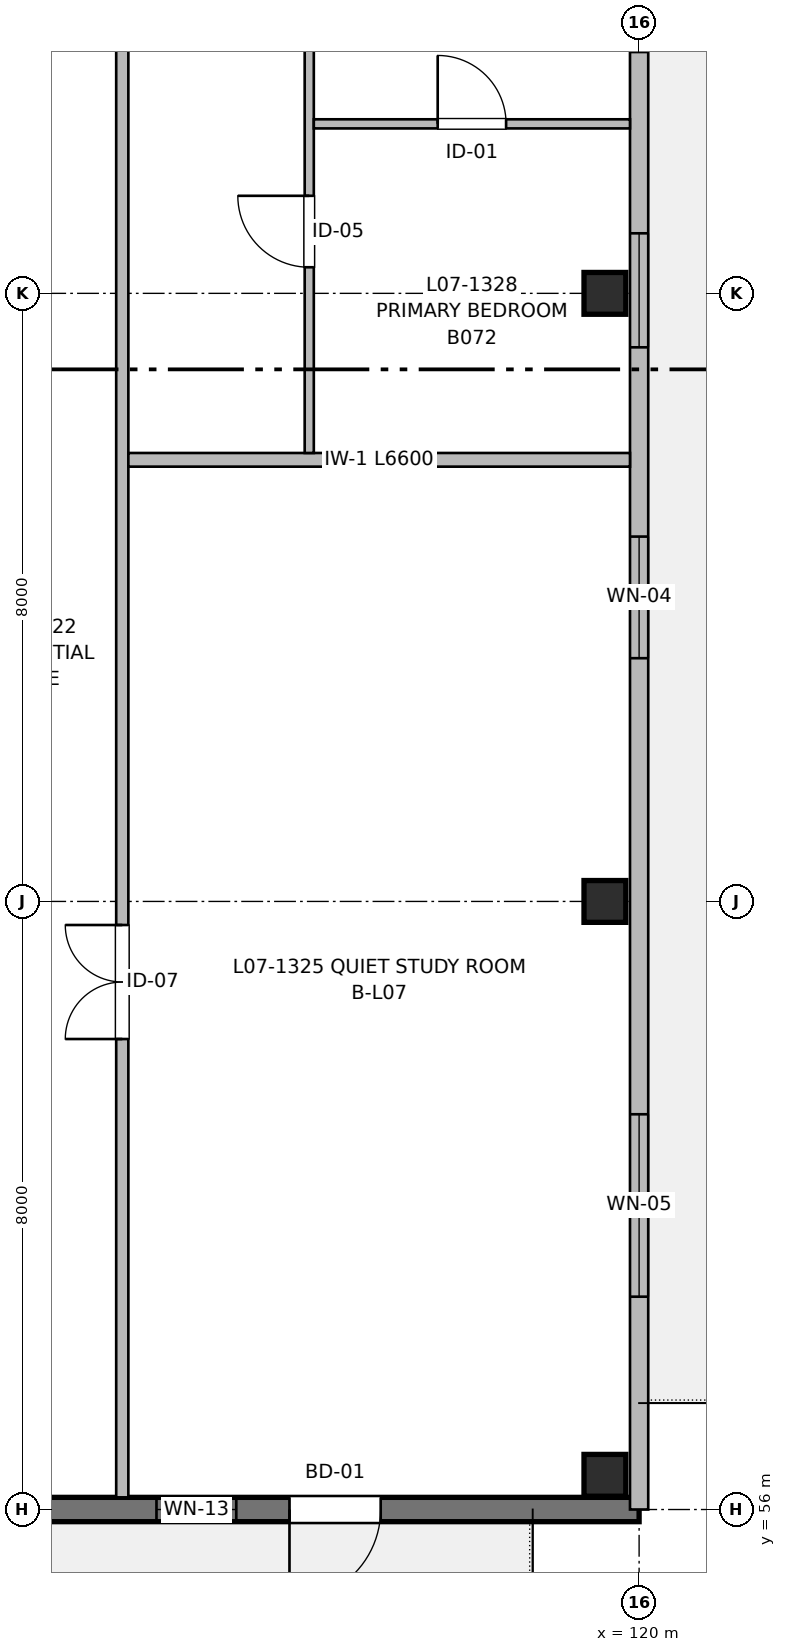
"""IFC4 building model, lengths in metres.
Left out: names, types, materials, properties, quantities, classifications, styles, units other than length and angle.
Written with IfcOpenShell. Run it as: python <this file> out.ifc"""

import sys

from ifc_helpers import new_model, si_unit, direction, frame, frame_2d, origin, origin_2d, place, context, subcontext, project, spatial, rectangle, extrude, element, fill, save


model = new_model("IFC4")
c1 = context("Model", 3, precision=1e-05, world=origin(), true_north=direction((0.0, 1.0)))
c2 = subcontext(c1, "Body", "Model", "MODEL_VIEW")
j1 = project(units=[si_unit("LENGTHUNIT", "METRE"), si_unit("PLANEANGLEUNIT", "RADIAN")], contexts=[c1])
p1 = place(None, origin())
s1 = spatial("IfcSite", under=j1, at=p1, CompositionType="ELEMENT")
p2 = place(p1, origin())
s2 = spatial("IfcBuilding", under=s1, at=p2, CompositionType="ELEMENT")
p3 = place(p2, frame((0.0, 0.0, 23.36)))
s3 = spatial("IfcBuildingStorey", under=s2, at=p3, CompositionType="ELEMENT", Elevation=23.36)
for number, where, z_axis, x_axis in (
    (1, (119.55, 56.45, 0.0), (0.0, 0.0, 1.0), (1.0, 0.0, 0.0)),
    (2, (119.55, 64.0, 0.0), (0.0, 0.0, 1.0), (1.0, 0.0, 0.0)),
    (3, (119.55, 72.0, 0.0), (0.0, 0.0, 1.0), (1.0, 0.0, 0.0)),
):
    element("IfcColumn", number, at=place(p3, frame(where, z_axis=z_axis, x_axis=x_axis)), inside=s3, PredefinedType="COLUMN", context=c2, shape_type="SweptSolid", body=[
        extrude(rectangle(XDim=0.55, YDim=0.55, at=origin_2d()), origin(), (0.0, 0.0, 1.0), 3.2),
    ])
p4 = place(p3, frame((120.0, 56.0, 0.0), z_axis=(0.0, 0.0, 1.0), x_axis=(-1.0, 0.0, 0.0)))
e4 = element("IfcWall", 4, at=p4, inside=s3, PredefinedType="SHEAR", context=c2, shape_type="SweptSolid", body=[
    extrude(rectangle(XDim=16.0, YDim=0.32, at=frame_2d((8.0, 0.0))), origin(), (0.0, 0.0, 1.0), 2.98),
])
p5 = place(p4, frame((3.4, 0.0, 0.0)))
e5 = element("IfcOpeningElement", 5, at=p5, cuts=e4, PredefinedType="OPENING", context=c2, shape_type="SweptSolid", body=[
    extrude(rectangle(XDim=1.2, YDim=2.2, at=frame_2d((0.6, 1.1))), frame((0.0, 0.17, 0.0), z_axis=(0.0, -1.0, 0.0), x_axis=(1.0, 0.0, 0.0)), (0.0, 0.0, 1.0), 0.34),
])
p6 = place(p4, frame((5.3, 0.0, 0.9)))
e6 = element("IfcOpeningElement", 6, at=p6, cuts=e4, PredefinedType="OPENING", context=c2, shape_type="SweptSolid", body=[
    extrude(rectangle(XDim=1.05, YDim=1.15, at=frame_2d((0.525, 0.575))), frame((0.0, 0.17, 0.0), z_axis=(0.0, -1.0, 0.0), x_axis=(1.0, 0.0, 0.0)), (0.0, 0.0, 1.0), 0.34),
])
p7 = place(p4, frame((11.175, 0.0, 0.77)))
e7 = element("IfcOpeningElement", 7, at=p7, cuts=e4, PredefinedType="OPENING", context=c2, shape_type="SweptSolid", body=[
    extrude(rectangle(XDim=1.65, YDim=1.45, at=frame_2d((0.825, 0.725))), frame((0.0, 0.17, 0.0), z_axis=(0.0, -1.0, 0.0), x_axis=(1.0, 0.0, 0.0)), (0.0, 0.0, 1.0), 0.34),
])
p8 = place(p3, frame((120.0, 88.0, 0.0), z_axis=(0.0, 0.0, 1.0), x_axis=(0.0, -1.0, 0.0)))
e8 = element("IfcWall", 8, at=p8, inside=s3, PredefinedType="SOLIDWALL", context=c2, shape_type="SweptSolid", body=[
    extrude(rectangle(XDim=32.0, YDim=0.24, at=frame_2d((16.0, 0.0))), origin(), (0.0, 0.0, 1.0), 2.98),
])
p9 = place(p8, frame((2.1, 0.0, 0.0)))
e9 = element("IfcOpeningElement", 9, at=p9, cuts=e8, PredefinedType="OPENING", context=c2, shape_type="SweptSolid", body=[
    extrude(rectangle(XDim=1.2, YDim=2.2, at=frame_2d((0.6, 1.1))), frame((0.0, 0.13, 0.0), z_axis=(0.0, -1.0, 0.0), x_axis=(1.0, 0.0, 0.0)), (0.0, 0.0, 1.0), 0.26),
])
p10 = place(p8, frame((5.3, 0.0, 0.9)))
e10 = element("IfcOpeningElement", 10, at=p10, cuts=e8, PredefinedType="OPENING", context=c2, shape_type="SweptSolid", body=[
    extrude(rectangle(XDim=1.05, YDim=1.15, at=frame_2d((0.525, 0.575))), frame((0.0, 0.13, 0.0), z_axis=(0.0, -1.0, 0.0), x_axis=(1.0, 0.0, 0.0)), (0.0, 0.0, 1.0), 0.26),
])
p11 = place(p8, frame((11.175, 0.0, 0.77)))
e11 = element("IfcOpeningElement", 11, at=p11, cuts=e8, PredefinedType="OPENING", context=c2, shape_type="SweptSolid", body=[
    extrude(rectangle(XDim=1.65, YDim=1.45, at=frame_2d((0.825, 0.725))), frame((0.0, 0.13, 0.0), z_axis=(0.0, -1.0, 0.0), x_axis=(1.0, 0.0, 0.0)), (0.0, 0.0, 1.0), 0.26),
])
p12 = place(p8, frame((19.2, 0.0, 0.77)))
e12 = element("IfcOpeningElement", 12, at=p12, cuts=e8, PredefinedType="OPENING", context=c2, shape_type="SweptSolid", body=[
    extrude(rectangle(XDim=1.6, YDim=1.45, at=frame_2d((0.8, 0.725))), frame((0.0, 0.13, 0.0), z_axis=(0.0, -1.0, 0.0), x_axis=(1.0, 0.0, 0.0)), (0.0, 0.0, 1.0), 0.26),
])
p13 = place(p8, frame((26.8, 0.0, 0.72)))
e13 = element("IfcOpeningElement", 13, at=p13, cuts=e8, PredefinedType="OPENING", context=c2, shape_type="SweptSolid", body=[
    extrude(rectangle(XDim=2.4, YDim=1.5, at=frame_2d((1.2, 0.75))), frame((0.0, 0.13, 0.0), z_axis=(0.0, -1.0, 0.0), x_axis=(1.0, 0.0, 0.0)), (0.0, 0.0, 1.0), 0.26),
])
p14 = place(p8, frame((15.21, 0.0, 0.82)))
e14 = element("IfcOpeningElement", 14, at=p14, cuts=e8, PredefinedType="OPENING", context=c2, shape_type="SweptSolid", body=[
    extrude(rectangle(XDim=1.5, YDim=1.4, at=frame_2d((0.75, 0.7))), frame((0.0, 0.13, 0.0), z_axis=(0.0, -1.0, 0.0), x_axis=(1.0, 0.0, 0.0)), (0.0, 0.0, 1.0), 0.26),
])
p15 = place(p3, frame((113.2, 56.16, 0.0), z_axis=(0.0, 0.0, 1.0), x_axis=(0.0, 1.0, 0.0)))
e15 = element("IfcWall", 15, at=p15, inside=s3, PredefinedType="PARTITIONING", context=c2, shape_type="SweptSolid", body=[
    extrude(rectangle(XDim=50.64, YDim=0.16, at=frame_2d((25.32, 0.0))), origin(), (0.0, 0.0, 1.0), 2.935),
])
p16 = place(p15, frame((6.03, 0.0, 0.0)))
e16 = element("IfcOpeningElement", 16, at=p16, cuts=e15, PredefinedType="OPENING", context=c2, shape_type="SweptSolid", body=[
    extrude(rectangle(XDim=1.5, YDim=2.2, at=frame_2d((0.75, 1.1))), frame((0.0, 0.09, 0.0), z_axis=(0.0, -1.0, 0.0), x_axis=(1.0, 0.0, 0.0)), (0.0, 0.0, 1.0), 0.18),
])
p17 = place(p15, frame((20.92, 0.0, 0.0)))
e17 = element("IfcOpeningElement", 17, at=p17, cuts=e15, PredefinedType="OPENING", context=c2, shape_type="SweptSolid", body=[
    extrude(rectangle(XDim=1.02, YDim=2.15, at=frame_2d((0.51, 1.075))), frame((0.0, 0.09, 0.0), z_axis=(0.0, -1.0, 0.0), x_axis=(1.0, 0.0, 0.0)), (0.0, 0.0, 1.0), 0.18),
])
p18 = place(p15, frame((33.68, 0.0, 0.0)))
e18 = element("IfcOpeningElement", 18, at=p18, cuts=e15, PredefinedType="OPENING", context=c2, shape_type="SweptSolid", body=[
    extrude(rectangle(XDim=0.98, YDim=2.15, at=frame_2d((0.49, 1.075))), frame((0.0, 0.09, 0.0), z_axis=(0.0, -1.0, 0.0), x_axis=(1.0, 0.0, 0.0)), (0.0, 0.0, 1.0), 0.18),
])
p19 = place(p15, frame((45.08, 0.0, 0.0)))
e19 = element("IfcOpeningElement", 19, at=p19, cuts=e15, PredefinedType="OPENING", context=c2, shape_type="SweptSolid", body=[
    extrude(rectangle(XDim=0.98, YDim=2.15, at=frame_2d((0.49, 1.075))), frame((0.0, 0.09, 0.0), z_axis=(0.0, -1.0, 0.0), x_axis=(1.0, 0.0, 0.0)), (0.0, 0.0, 1.0), 0.18),
])
p20 = place(p3, frame((113.28, 69.81, 0.0), z_axis=(0.0, 0.0, 1.0), x_axis=(1.0, 0.0, 0.0)))
e20 = element("IfcWall", 20, at=p20, inside=s3, PredefinedType="PARTITIONING", context=c2, shape_type="SweptSolid", body=[
    extrude(rectangle(XDim=6.6, YDim=0.18, at=frame_2d((3.3, 0.0))), origin(), (0.0, 0.0, 1.0), 2.935),
])
p21 = place(p3, frame((115.66, 69.9, 0.0), z_axis=(0.0, 0.0, 1.0), x_axis=(0.0, 1.0, 0.0)))
e21 = element("IfcWall", 21, at=p21, inside=s3, PredefinedType="PARTITIONING", context=c2, shape_type="SweptSolid", body=[
    extrude(rectangle(XDim=13.98, YDim=0.12, at=frame_2d((6.99, 0.0))), origin(), (0.0, 0.0, 1.0), 2.935),
])
p22 = place(p21, frame((2.443, 0.0, 0.0)))
e22 = element("IfcOpeningElement", 22, at=p22, cuts=e21, PredefinedType="OPENING", context=c2, shape_type="SweptSolid", body=[
    extrude(rectangle(XDim=0.94, YDim=2.1, at=frame_2d((0.47, 1.05))), frame((0.0, 0.07, 0.0), z_axis=(0.0, -1.0, 0.0), x_axis=(1.0, 0.0, 0.0)), (0.0, 0.0, 1.0), 0.14),
])
p23 = place(p21, frame((8.544, 0.0, 0.0)))
e23 = element("IfcOpeningElement", 23, at=p23, cuts=e21, PredefinedType="OPENING", context=c2, shape_type="SweptSolid", body=[
    extrude(rectangle(XDim=0.92, YDim=2.1, at=frame_2d((0.46, 1.05))), frame((0.0, 0.07, 0.0), z_axis=(0.0, -1.0, 0.0), x_axis=(1.0, 0.0, 0.0)), (0.0, 0.0, 1.0), 0.14),
])
p24 = place(p3, frame((115.72, 74.23, 0.0), z_axis=(0.0, 0.0, 1.0), x_axis=(1.0, 0.0, 0.0)))
e24 = element("IfcWall", 24, at=p24, inside=s3, PredefinedType="PARTITIONING", context=c2, shape_type="SweptSolid", body=[
    extrude(rectangle(XDim=4.16, YDim=0.12, at=frame_2d((2.08, 0.0))), origin(), (0.0, 0.0, 1.0), 2.935),
])
p25 = place(p24, frame((1.63, 0.0, 0.0)))
e25 = element("IfcOpeningElement", 25, at=p25, cuts=e24, PredefinedType="OPENING", context=c2, shape_type="SweptSolid", body=[
    extrude(rectangle(XDim=0.9, YDim=2.1, at=frame_2d((0.45, 1.05))), frame((0.0, 0.07, 0.0), z_axis=(0.0, -1.0, 0.0), x_axis=(1.0, 0.0, 0.0)), (0.0, 0.0, 1.0), 0.14),
])
p26 = place(p5, origin())
e26 = element("IfcDoor", 26, at=p26, inside=s3, OperationType="SINGLE_SWING_RIGHT", PredefinedType="DOOR", context=c2, shape_type="SweptSolid", body=[
    extrude(rectangle(XDim=1.2, YDim=2.2, at=frame_2d((0.6, 1.1))), frame((0.0, 0.025, 0.0), z_axis=(0.0, -1.0, 0.0), x_axis=(1.0, 0.0, 0.0)), (0.0, 0.0, 1.0), 0.05),
])
fill(e5, e26)
p27 = place(p6, origin())
e27 = element("IfcWindow", 27, at=p27, inside=s3, PartitioningType="SINGLE_PANEL", PredefinedType="WINDOW", context=c2, shape_type="SweptSolid", body=[
    extrude(rectangle(XDim=1.05, YDim=1.15, at=frame_2d((0.525, 0.575))), frame((0.0, 0.03, 0.0), z_axis=(0.0, -1.0, 0.0), x_axis=(1.0, 0.0, 0.0)), (0.0, 0.0, 1.0), 0.06),
])
fill(e6, e27)
p28 = place(p12, origin())
e28 = element("IfcWindow", 28, at=p28, inside=s3, PartitioningType="SINGLE_PANEL", PredefinedType="WINDOW", context=c2, shape_type="SweptSolid", body=[
    extrude(rectangle(XDim=1.6, YDim=1.45, at=frame_2d((0.8, 0.725))), frame((0.0, 0.03, 0.0), z_axis=(0.0, -1.0, 0.0), x_axis=(1.0, 0.0, 0.0)), (0.0, 0.0, 1.0), 0.06),
])
fill(e12, e28)
p29 = place(p13, origin())
e29 = element("IfcWindow", 29, at=p29, inside=s3, PartitioningType="SINGLE_PANEL", PredefinedType="WINDOW", context=c2, shape_type="SweptSolid", body=[
    extrude(rectangle(XDim=2.4, YDim=1.5, at=frame_2d((1.2, 0.75))), frame((0.0, 0.03, 0.0), z_axis=(0.0, -1.0, 0.0), x_axis=(1.0, 0.0, 0.0)), (0.0, 0.0, 1.0), 0.06),
])
fill(e13, e29)
p30 = place(p16, origin())
e30 = element("IfcDoor", 30, at=p30, inside=s3, OperationType="DOUBLE_DOOR_SINGLE_SWING", PredefinedType="DOOR", context=c2, shape_type="SweptSolid", body=[
    extrude(rectangle(XDim=1.5, YDim=2.2, at=frame_2d((0.75, 1.1))), frame((0.0, 0.025, 0.0), z_axis=(0.0, -1.0, 0.0), x_axis=(1.0, 0.0, 0.0)), (0.0, 0.0, 1.0), 0.05),
])
fill(e16, e30)
p31 = place(p22, origin())
e31 = element("IfcDoor", 31, at=p31, inside=s3, OperationType="SINGLE_SWING_RIGHT", PredefinedType="DOOR", context=c2, shape_type="SweptSolid", body=[
    extrude(rectangle(XDim=0.94, YDim=2.1, at=frame_2d((0.47, 1.05))), frame((0.0, 0.025, 0.0), z_axis=(0.0, -1.0, 0.0), x_axis=(1.0, 0.0, 0.0)), (0.0, 0.0, 1.0), 0.05),
])
fill(e22, e31)
p32 = place(p25, origin())
e32 = element("IfcDoor", 32, at=p32, inside=s3, OperationType="SINGLE_SWING_LEFT", PredefinedType="DOOR", context=c2, shape_type="SweptSolid", body=[
    extrude(rectangle(XDim=0.9, YDim=2.1, at=frame_2d((0.45, 1.05))), frame((0.0, 0.025, 0.0), z_axis=(0.0, -1.0, 0.0), x_axis=(1.0, 0.0, 0.0)), (0.0, 0.0, 1.0), 0.05),
])
fill(e25, e32)
p33 = place(p14, origin())
e33 = element("IfcWindow", 33, at=p33, inside=s3, PartitioningType="SINGLE_PANEL", PredefinedType="WINDOW", context=c2, shape_type="SweptSolid", body=[
    extrude(rectangle(XDim=1.5, YDim=1.4, at=frame_2d((0.75, 0.7))), frame((0.0, 0.03, 0.0), z_axis=(0.0, -1.0, 0.0), x_axis=(1.0, 0.0, 0.0)), (0.0, 0.0, 1.0), 0.06),
])
fill(e14, e33)
save(model, sys.argv[1])
